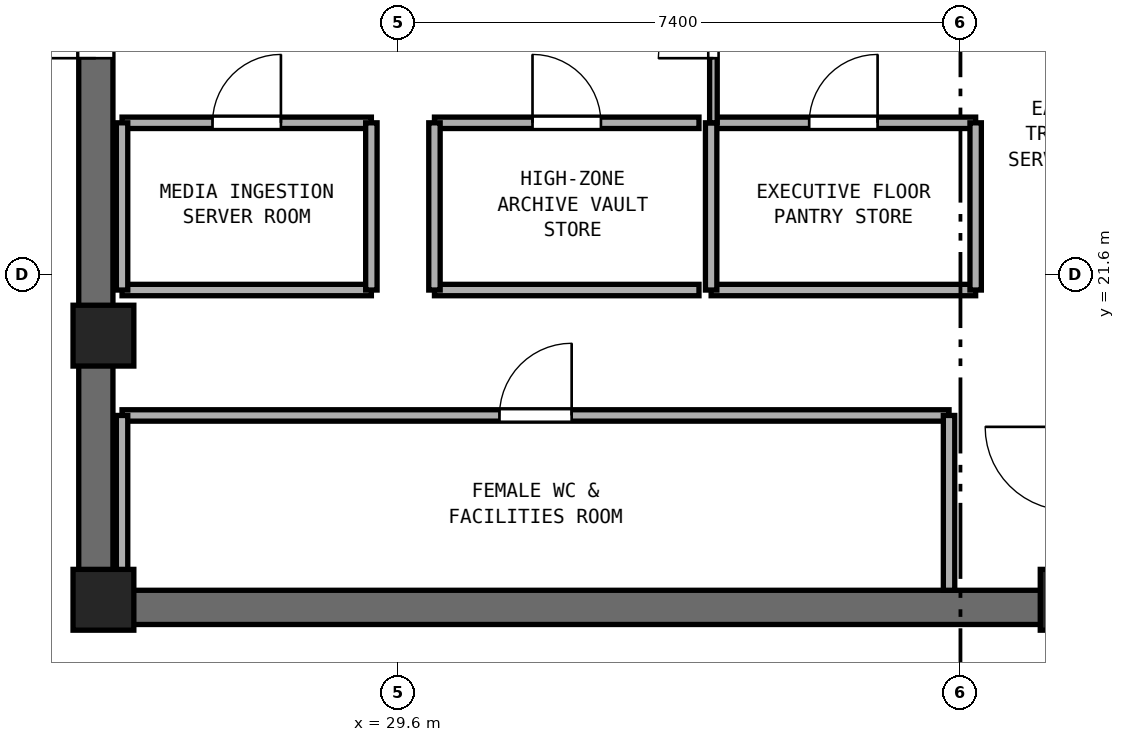
"""IFC4 building model, lengths in metres.
Left out: names, types, materials, properties, quantities, classifications, styles, units other than length and angle.
Written with IfcOpenShell. Run it as: python <this file> out.ifc"""

import sys

from ifc_helpers import new_model, si_unit, direction, frame, frame_2d, origin, origin_2d, place, context, subcontext, project, spatial, rectangle, extrude, element, fill, save


model = new_model("IFC4")
c1 = context("Model", 3, precision=1e-05, world=origin(), true_north=direction((0.0, 1.0)))
c2 = subcontext(c1, "Body", "Model", "MODEL_VIEW")
j1 = project(units=[si_unit("LENGTHUNIT", "METRE"), si_unit("PLANEANGLEUNIT", "RADIAN")], contexts=[c1])
p1 = place(None, origin())
s1 = spatial("IfcSite", under=j1, at=p1, CompositionType="ELEMENT")
p2 = place(p1, origin())
s2 = spatial("IfcBuilding", under=s1, at=p2, CompositionType="ELEMENT")
p3 = place(p2, frame((0.0, 0.0, 278.2)))
s3 = spatial("IfcBuildingStorey", under=s2, at=p3, CompositionType="ELEMENT", Elevation=278.2)
p4 = place(p3, frame((25.4, 17.225, 0.0), z_axis=(0.0, 0.0, 1.0), x_axis=(1.0, 0.0, 0.0)))
e1 = element("IfcWall", 1, at=p4, inside=s3, PredefinedType="SHEAR", context=c2, shape_type="SweptSolid", body=[
    extrude(rectangle(XDim=23.2, YDim=0.45, at=frame_2d((11.6, 0.0))), origin(), (0.0, 0.0, 1.0), 3.54),
])
p5 = place(p3, frame((25.625, 17.45, 0.0), z_axis=(0.0, 0.0, 1.0), x_axis=(0.0, 1.0, 0.0)))
e2 = element("IfcWall", 2, at=p5, inside=s3, PredefinedType="SHEAR", context=c2, shape_type="SweptSolid", body=[
    extrude(rectangle(XDim=15.5, YDim=0.45, at=frame_2d((7.75, 0.0))), origin(), (0.0, 0.0, 1.0), 3.54),
])
p6 = place(p5, frame((7.0, 0.0, 0.0)))
e3 = element("IfcOpeningElement", 3, at=p6, cuts=e2, PredefinedType="OPENING", context=c2, shape_type="SweptSolid", body=[
    extrude(rectangle(XDim=1.5, YDim=2.15, at=frame_2d((0.75, 1.075))), frame((0.0, 0.235, 0.0), z_axis=(0.0, -1.0, 0.0), x_axis=(1.0, 0.0, 0.0)), (0.0, 0.0, 1.0), 0.47),
])
for number, where, z_axis, x_axis in (
    (4, (25.725, 17.325, 0.0), (0.0, 0.0, 1.0), (1.0, 0.0, 0.0)),
    (5, (38.45, 17.325, 0.0), (0.0, 0.0, 1.0), (1.0, 0.0, 0.0)),
    (6, (25.725, 20.8, 0.0), (0.0, 0.0, 1.0), (1.0, 0.0, 0.0)),
):
    element("IfcColumn", number, at=place(p3, frame(where, z_axis=z_axis, x_axis=x_axis)), inside=s3, PredefinedType="PILASTER", context=c2, shape_type="SweptSolid", body=[
        extrude(rectangle(XDim=0.8, YDim=0.8, at=origin_2d()), origin(), (0.0, 0.0, 1.0), 3.8),
    ])
p7 = place(p3, frame((25.97, 19.75, 0.0), z_axis=(0.0, 0.0, 1.0), x_axis=(1.0, 0.0, 0.0)))
e7 = element("IfcWall", 7, at=p7, inside=s3, PredefinedType="PARTITIONING", context=c2, shape_type="SweptSolid", body=[
    extrude(rectangle(XDim=10.88, YDim=0.15, at=frame_2d((5.44, 0.0))), origin(), (0.0, 0.0, 1.0), 3.54),
])
p8 = place(p7, frame((4.965, 0.0, 0.0)))
e8 = element("IfcOpeningElement", 8, at=p8, cuts=e7, PredefinedType="OPENING", context=c2, shape_type="SweptSolid", body=[
    extrude(rectangle(XDim=0.95, YDim=2.1, at=frame_2d((0.475, 1.05))), frame((0.0, 0.085, 0.0), z_axis=(0.0, -1.0, 0.0), x_axis=(1.0, 0.0, 0.0)), (0.0, 0.0, 1.0), 0.17),
])
p9 = place(p3, frame((25.97, 17.45, 0.0), z_axis=(0.0, 0.0, 1.0), x_axis=(0.0, 1.0, 0.0)))
e9 = element("IfcWall", 9, at=p9, inside=s3, PredefinedType="PARTITIONING", context=c2, shape_type="SweptSolid", body=[
    extrude(rectangle(XDim=2.3, YDim=0.15, at=frame_2d((1.15, 0.0))), origin(), (0.0, 0.0, 1.0), 2.64),
])
p10 = place(p3, frame((36.85, 17.45, 0.0), z_axis=(0.0, 0.0, 1.0), x_axis=(0.0, 1.0, 0.0)))
e10 = element("IfcWall", 10, at=p10, inside=s3, PredefinedType="PARTITIONING", context=c2, shape_type="SweptSolid", body=[
    extrude(rectangle(XDim=2.3, YDim=0.15, at=frame_2d((1.15, 0.0))), origin(), (0.0, 0.0, 1.0), 3.54),
])
p11 = place(p3, frame((25.97, 21.4, 0.0), z_axis=(0.0, 0.0, 1.0), x_axis=(1.0, 0.0, 0.0)))
e11 = element("IfcWall", 11, at=p11, inside=s3, PredefinedType="PARTITIONING", context=c2, shape_type="SweptSolid", body=[
    extrude(rectangle(XDim=3.28, YDim=0.15, at=frame_2d((1.64, 0.0))), origin(), (0.0, 0.0, 1.0), 3.54),
])
p12 = place(p3, frame((25.97, 23.6, 0.0), z_axis=(0.0, 0.0, 1.0), x_axis=(1.0, 0.0, 0.0)))
e12 = element("IfcWall", 12, at=p12, inside=s3, PredefinedType="PARTITIONING", context=c2, shape_type="SweptSolid", body=[
    extrude(rectangle(XDim=3.28, YDim=0.15, at=frame_2d((1.64, 0.0))), origin(), (0.0, 0.0, 1.0), 3.54),
])
p13 = place(p12, frame((1.19, 0.0, 0.0)))
e13 = element("IfcOpeningElement", 13, at=p13, cuts=e12, PredefinedType="OPENING", context=c2, shape_type="SweptSolid", body=[
    extrude(rectangle(XDim=0.9, YDim=2.1, at=frame_2d((0.45, 1.05))), frame((0.0, 0.085, 0.0), z_axis=(0.0, -1.0, 0.0), x_axis=(1.0, 0.0, 0.0)), (0.0, 0.0, 1.0), 0.17),
])
p14 = place(p3, frame((25.97, 21.4, 0.0), z_axis=(0.0, 0.0, 1.0), x_axis=(0.0, 1.0, 0.0)))
e14 = element("IfcWall", 14, at=p14, inside=s3, PredefinedType="PARTITIONING", context=c2, shape_type="SweptSolid", body=[
    extrude(rectangle(XDim=2.2, YDim=0.15, at=frame_2d((1.1, 0.0))), origin(), (0.0, 0.0, 1.0), 2.64),
])
p15 = place(p3, frame((29.25, 21.4, 0.0), z_axis=(0.0, 0.0, 1.0), x_axis=(0.0, 1.0, 0.0)))
e15 = element("IfcWall", 15, at=p15, inside=s3, PredefinedType="PARTITIONING", context=c2, shape_type="SweptSolid", body=[
    extrude(rectangle(XDim=2.2, YDim=0.15, at=frame_2d((1.1, 0.0))), origin(), (0.0, 0.0, 1.0), 3.54),
])
p16 = place(p3, frame((30.08, 21.4, 0.0), z_axis=(0.0, 0.0, 1.0), x_axis=(1.0, 0.0, 0.0)))
e16 = element("IfcWall", 16, at=p16, inside=s3, PredefinedType="PARTITIONING", context=c2, shape_type="SweptSolid", body=[
    extrude(rectangle(XDim=3.48, YDim=0.15, at=frame_2d((1.74, 0.0))), origin(), (0.0, 0.0, 1.0), 3.54),
])
p17 = place(p3, frame((30.08, 23.6, 0.0), z_axis=(0.0, 0.0, 1.0), x_axis=(1.0, 0.0, 0.0)))
e17 = element("IfcWall", 17, at=p17, inside=s3, PredefinedType="PARTITIONING", context=c2, shape_type="SweptSolid", body=[
    extrude(rectangle(XDim=3.48, YDim=0.15, at=frame_2d((1.74, 0.0))), origin(), (0.0, 0.0, 1.0), 3.54),
])
p18 = place(p17, frame((1.29, 0.0, 0.0)))
e18 = element("IfcOpeningElement", 18, at=p18, cuts=e17, PredefinedType="OPENING", context=c2, shape_type="SweptSolid", body=[
    extrude(rectangle(XDim=0.9, YDim=2.1, at=frame_2d((0.45, 1.05))), frame((0.0, 0.085, 0.0), z_axis=(0.0, -1.0, 0.0), x_axis=(1.0, 0.0, 0.0)), (0.0, 0.0, 1.0), 0.17),
])
p19 = place(p3, frame((30.08, 21.4, 0.0), z_axis=(0.0, 0.0, 1.0), x_axis=(0.0, 1.0, 0.0)))
e19 = element("IfcWall", 19, at=p19, inside=s3, PredefinedType="PARTITIONING", context=c2, shape_type="SweptSolid", body=[
    extrude(rectangle(XDim=2.2, YDim=0.15, at=frame_2d((1.1, 0.0))), origin(), (0.0, 0.0, 1.0), 3.54),
])
p20 = place(p3, frame((33.72, 21.4, 0.0), z_axis=(0.0, 0.0, 1.0), x_axis=(1.0, 0.0, 0.0)))
e20 = element("IfcWall", 20, at=p20, inside=s3, PredefinedType="PARTITIONING", context=c2, shape_type="SweptSolid", body=[
    extrude(rectangle(XDim=3.48, YDim=0.15, at=frame_2d((1.74, 0.0))), origin(), (0.0, 0.0, 1.0), 3.54),
])
p21 = place(p3, frame((33.72, 23.6, 0.0), z_axis=(0.0, 0.0, 1.0), x_axis=(1.0, 0.0, 0.0)))
e21 = element("IfcWall", 21, at=p21, inside=s3, PredefinedType="PARTITIONING", context=c2, shape_type="SweptSolid", body=[
    extrude(rectangle(XDim=3.48, YDim=0.15, at=frame_2d((1.74, 0.0))), origin(), (0.0, 0.0, 1.0), 3.54),
])
p22 = place(p21, frame((1.29, 0.0, 0.0)))
e22 = element("IfcOpeningElement", 22, at=p22, cuts=e21, PredefinedType="OPENING", context=c2, shape_type="SweptSolid", body=[
    extrude(rectangle(XDim=0.9, YDim=2.1, at=frame_2d((0.45, 1.05))), frame((0.0, 0.085, 0.0), z_axis=(0.0, -1.0, 0.0), x_axis=(1.0, 0.0, 0.0)), (0.0, 0.0, 1.0), 0.17),
])
for number, where, z_axis, x_axis in (
    (23, (33.72, 21.4, 0.0), (0.0, 0.0, 1.0), (0.0, 1.0, 0.0)),
    (24, (37.2, 21.4, 0.0), (0.0, 0.0, 1.0), (0.0, 1.0, 0.0)),
):
    element("IfcWall", number, at=place(p3, frame(where, z_axis=z_axis, x_axis=x_axis)), inside=s3, PredefinedType="PARTITIONING", context=c2, shape_type="SweptSolid", body=[
        extrude(rectangle(XDim=2.2, YDim=0.15, at=frame_2d((1.1, 0.0))), origin(), (0.0, 0.0, 1.0), 3.54),
    ])
p23 = place(p3, frame((33.75, 23.6, 0.0), z_axis=(0.0, 0.0, 1.0), x_axis=(0.0, 1.0, 0.0)))
e25 = element("IfcWall", 25, at=p23, inside=s3, PredefinedType="PARTITIONING", context=c2, shape_type="SweptSolid", body=[
    extrude(rectangle(XDim=3.2, YDim=0.1, at=frame_2d((1.6, 0.0))), origin(), (0.0, 0.0, 1.0), 3.54),
])
p24 = place(p23, frame((0.85, 0.0, 0.0)))
e26 = element("IfcOpeningElement", 26, at=p24, cuts=e25, PredefinedType="OPENING", context=c2, shape_type="SweptSolid", body=[
    extrude(rectangle(XDim=1.45, YDim=2.12, at=frame_2d((0.725, 1.06))), frame((0.0, 0.06, 0.0), z_axis=(0.0, -1.0, 0.0), x_axis=(1.0, 0.0, 0.0)), (0.0, 0.0, 1.0), 0.12),
])
p25 = place(p6, origin())
e27 = element("IfcDoor", 27, at=p25, inside=s3, OperationType="DOUBLE_DOOR_SINGLE_SWING", PredefinedType="DOOR", context=c2, shape_type="SweptSolid", body=[
    extrude(rectangle(XDim=1.5, YDim=2.15, at=frame_2d((0.75, 1.075))), frame((0.0, 0.025, 0.0), z_axis=(0.0, -1.0, 0.0), x_axis=(1.0, 0.0, 0.0)), (0.0, 0.0, 1.0), 0.05),
])
fill(e3, e27)
p26 = place(p8, origin())
e28 = element("IfcDoor", 28, at=p26, inside=s3, OperationType="SINGLE_SWING_RIGHT", PredefinedType="DOOR", context=c2, shape_type="SweptSolid", body=[
    extrude(rectangle(XDim=0.95, YDim=2.1, at=frame_2d((0.475, 1.05))), frame((0.0, 0.025, 0.0), z_axis=(0.0, -1.0, 0.0), x_axis=(1.0, 0.0, 0.0)), (0.0, 0.0, 1.0), 0.05),
])
fill(e8, e28)
p27 = place(p13, origin())
e29 = element("IfcDoor", 29, at=p27, inside=s3, OperationType="SINGLE_SWING_RIGHT", PredefinedType="DOOR", context=c2, shape_type="SweptSolid", body=[
    extrude(rectangle(XDim=0.9, YDim=2.1, at=frame_2d((0.45, 1.05))), frame((0.0, 0.025, 0.0), z_axis=(0.0, -1.0, 0.0), x_axis=(1.0, 0.0, 0.0)), (0.0, 0.0, 1.0), 0.05),
])
fill(e13, e29)
p28 = place(p18, origin())
e30 = element("IfcDoor", 30, at=p28, inside=s3, OperationType="SINGLE_SWING_LEFT", PredefinedType="DOOR", context=c2, shape_type="SweptSolid", body=[
    extrude(rectangle(XDim=0.9, YDim=2.1, at=frame_2d((0.45, 1.05))), frame((0.0, 0.025, 0.0), z_axis=(0.0, -1.0, 0.0), x_axis=(1.0, 0.0, 0.0)), (0.0, 0.0, 1.0), 0.05),
])
fill(e18, e30)
p29 = place(p22, origin())
e31 = element("IfcDoor", 31, at=p29, inside=s3, OperationType="SINGLE_SWING_RIGHT", PredefinedType="DOOR", context=c2, shape_type="SweptSolid", body=[
    extrude(rectangle(XDim=0.9, YDim=2.1, at=frame_2d((0.45, 1.05))), frame((0.0, 0.025, 0.0), z_axis=(0.0, -1.0, 0.0), x_axis=(1.0, 0.0, 0.0)), (0.0, 0.0, 1.0), 0.05),
])
fill(e22, e31)
p30 = place(p24, origin())
e32 = element("IfcDoor", 32, at=p30, inside=s3, OperationType="DOUBLE_DOOR_SINGLE_SWING", PredefinedType="DOOR", context=c2, shape_type="SweptSolid", body=[
    extrude(rectangle(XDim=1.45, YDim=2.12, at=frame_2d((0.725, 1.06))), frame((0.0, 0.025, 0.0), z_axis=(0.0, -1.0, 0.0), x_axis=(1.0, 0.0, 0.0)), (0.0, 0.0, 1.0), 0.05),
])
fill(e26, e32)
save(model, sys.argv[1])
